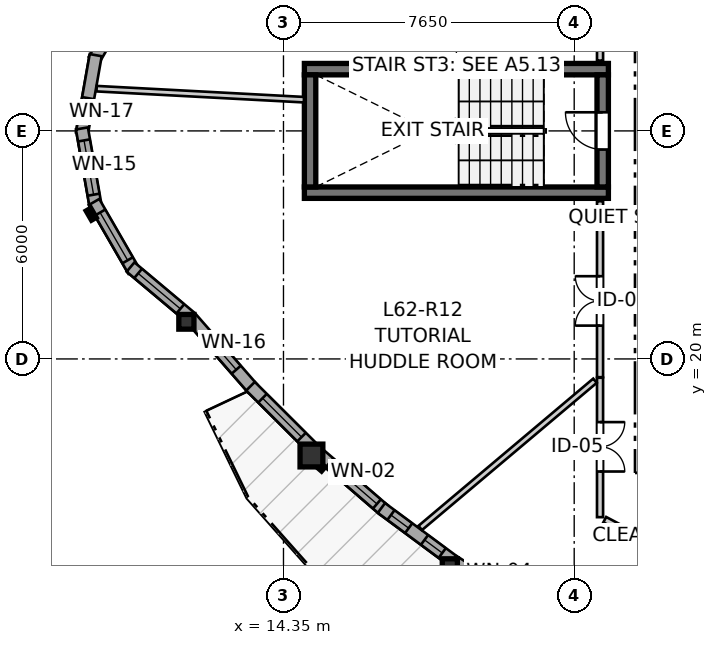
"""IFC4 building model, lengths in metres.
Left out: names, types, materials, properties, quantities, classifications, styles, units other than length and angle.
Written with IfcOpenShell. Run it as: python <this file> out.ifc"""

import sys

from ifc_helpers import new_model, si_unit, direction, frame, frame_2d, origin, origin_2d, place, context, subcontext, project, spatial, rectangle, i_section, extrude, source, transform, mapped, element, fill, save


model = new_model("IFC4")
c1 = context("Model", 3, precision=1e-05, world=origin(), true_north=direction((0.0, 1.0)))
c2 = subcontext(c1, "Body", "Model", "MODEL_VIEW")
j1 = project(units=[si_unit("LENGTHUNIT", "METRE"), si_unit("PLANEANGLEUNIT", "RADIAN")], contexts=[c1])
p1 = place(None, origin())
s1 = spatial("IfcSite", under=j1, at=p1, CompositionType="ELEMENT")
p2 = place(p1, origin())
s2 = spatial("IfcBuilding", under=s1, at=p2, CompositionType="ELEMENT")
p3 = place(p2, frame((0.0, 0.0, 208.4)))
s3 = spatial("IfcBuildingStorey", under=s2, at=p3, CompositionType="ELEMENT", Elevation=208.4)
for number, where, z_axis, x_axis in (
    (1, (14.9, 24.375, 0.0), (0.0, 0.0, 1.0), (1.0, 0.0, 0.0)),
    (2, (22.9, 27.625, 0.0), (0.0, 0.0, 1.0), (-1.0, 0.0, 0.0)),
):
    element("IfcWall", number, at=place(p3, frame(where, z_axis=z_axis, x_axis=x_axis)), inside=s3, PredefinedType="SHEAR", context=c2, shape_type="SweptSolid", body=[
        extrude(rectangle(XDim=8.0, YDim=0.3, at=frame_2d((4.0, 0.0))), origin(), (0.0, 0.0, 1.0), 2.935),
    ])
p4 = place(p3, frame((15.05, 27.475, 0.0), z_axis=(0.0, 0.0, 1.0), x_axis=(0.0, -1.0, 0.0)))
e3 = element("IfcWall", 3, at=p4, inside=s3, PredefinedType="SHEAR", context=c2, shape_type="SweptSolid", body=[
    extrude(rectangle(XDim=2.95, YDim=0.3, at=frame_2d((1.475, 0.0))), origin(), (0.0, 0.0, 1.0), 2.935),
])
p5 = place(p3, frame((22.75, 24.525, 0.0), z_axis=(0.0, 0.0, 1.0), x_axis=(0.0, 1.0, 0.0)))
e4 = element("IfcWall", 4, at=p5, inside=s3, PredefinedType="SHEAR", context=c2, shape_type="SweptSolid", body=[
    extrude(rectangle(XDim=2.95, YDim=0.3, at=frame_2d((1.475, 0.0))), origin(), (0.0, 0.0, 1.0), 2.935),
])
p6 = place(p5, frame((0.985, 0.0, 0.0)))
e5 = element("IfcOpeningElement", 5, at=p6, cuts=e4, PredefinedType="OPENING", context=c2, shape_type="SweptSolid", body=[
    extrude(rectangle(XDim=0.98, YDim=2.15, at=frame_2d((0.49, 1.075))), frame((0.0, 0.16, 0.0), z_axis=(0.0, -1.0, 0.0), x_axis=(1.0, 0.0, 0.0)), (0.0, 0.0, 1.0), 0.32),
])
m1 = source(origin(), c2, "Body", "SweptSolid", [
    extrude(i_section(OverallWidth=0.398, OverallDepth=0.387, WebThickness=0.019, FlangeThickness=0.03, FilletRadius=0.015, at=origin_2d()), origin(), (0.0, 0.0, 1.0), 2.935),
])
p7 = place(p3, frame((11.795, 20.977, 0.0), z_axis=(0.0, 0.0, 1.0), x_axis=(1.0, 0.0, 0.0)))
e6 = element("IfcColumn", 6, at=p7, inside=s3, PredefinedType="PILASTER", context=c2, shape_type="MappedRepresentation", body=[
    mapped(m1, transform((0.0, 0.0, 0.0), x_axis=(1.0, 0.0, 0.0), y_axis=(0.0, 1.0, 0.0), z_axis=(0.0, 0.0, 1.0), scale=1.0)),
])
m2 = source(origin(), c2, "Body", "SweptSolid", [
    extrude(rectangle(XDim=0.6, YDim=0.6, at=origin_2d()), origin(), (0.0, 0.0, 1.0), 2.935),
])
p8 = place(p3, frame((15.086, 17.459, 0.0), z_axis=(0.0, 0.0, 1.0), x_axis=(1.0, 0.0, 0.0)))
e7 = element("IfcColumn", 7, at=p8, inside=s3, PredefinedType="COLUMN", context=c2, shape_type="MappedRepresentation", body=[
    mapped(m2, transform((0.0, 0.0, 0.0), x_axis=(1.0, 0.0, 0.0), y_axis=(0.0, 1.0, 0.0), z_axis=(0.0, 0.0, 1.0), scale=1.0)),
])
p9 = place(p3, frame((18.727, 14.548, 0.0), z_axis=(0.0, 0.0, 1.0), x_axis=(1.0, 0.0, 0.0)))
e8 = element("IfcColumn", 8, at=p9, inside=s3, PredefinedType="PILASTER", context=c2, shape_type="MappedRepresentation", body=[
    mapped(m1, transform((0.0, 0.0, 0.0), x_axis=(1.0, 0.0, 0.0), y_axis=(0.0, 1.0, 0.0), z_axis=(0.0, 0.0, 1.0), scale=1.0)),
])
p10 = place(p3, frame((10.409, 29.681, 0.0), z_axis=(0.0, 0.0, 1.0), x_axis=(-0.49990781971, -0.866078617559, 0.0)))
e9 = element("IfcWall", 9, at=p10, inside=s3, PredefinedType="SOLIDWALL", context=c2, shape_type="SweptSolid", body=[
    extrude(rectangle(XDim=2.09, YDim=0.32, at=frame_2d((1.045, 0.0))), origin(), (0.0, 0.0, 1.0), 2.555),
])
p11 = place(p10, frame((0.42, 0.0, 0.82)))
e10 = element("IfcOpeningElement", 10, at=p11, cuts=e9, PredefinedType="OPENING", context=c2, shape_type="SweptSolid", body=[
    extrude(rectangle(XDim=1.25, YDim=1.35, at=frame_2d((0.625, 0.675))), frame((0.0, 0.17, 0.0), z_axis=(0.0, -1.0, 0.0), x_axis=(1.0, 0.0, 0.0)), (0.0, 0.0, 1.0), 0.34),
])
p12 = place(p3, frame((9.409, 27.993, 0.0), z_axis=(0.0, 0.0, 1.0), x_axis=(-0.173672066494, -0.984803540469, 0.0)))
e11 = element("IfcWall", 11, at=p12, inside=s3, PredefinedType="SOLIDWALL", context=c2, shape_type="SweptSolid", body=[
    extrude(rectangle(XDim=2.09, YDim=0.32, at=frame_2d((1.045, 0.0))), origin(), (0.0, 0.0, 1.0), 2.555),
])
p13 = place(p12, frame((1.149, 0.0, 0.82)))
e12 = element("IfcOpeningElement", 12, at=p13, cuts=e11, PredefinedType="OPENING", context=c2, shape_type="SweptSolid", body=[
    extrude(rectangle(XDim=0.58, YDim=1.35, at=frame_2d((0.29, 0.675))), frame((0.0, 0.17, 0.0), z_axis=(0.0, -1.0, 0.0), x_axis=(1.0, 0.0, 0.0)), (0.0, 0.0, 1.0), 0.34),
])
p14 = place(p3, frame((9.046, 26.065, 0.0), z_axis=(0.0, 0.0, 1.0), x_axis=(0.173672066494, -0.984803540469, 0.0)))
e13 = element("IfcWall", 13, at=p14, inside=s3, PredefinedType="SOLIDWALL", context=c2, shape_type="SweptSolid", body=[
    extrude(rectangle(XDim=2.09, YDim=0.32, at=frame_2d((1.045, 0.0))), origin(), (0.0, 0.0, 1.0), 2.555),
])
p15 = place(p14, frame((0.32, 0.0, 0.82)))
e14 = element("IfcOpeningElement", 14, at=p15, cuts=e13, PredefinedType="OPENING", context=c2, shape_type="SweptSolid", body=[
    extrude(rectangle(XDim=1.45, YDim=1.25, at=frame_2d((0.725, 0.625))), frame((0.0, 0.17, 0.0), z_axis=(0.0, -1.0, 0.0), x_axis=(1.0, 0.0, 0.0)), (0.0, 0.0, 1.0), 0.34),
])
p16 = place(p3, frame((9.365, 24.129, 0.0), z_axis=(0.0, 0.0, 1.0), x_axis=(0.49990781971, -0.866078617559, 0.0)))
e15 = element("IfcWall", 15, at=p16, inside=s3, PredefinedType="SOLIDWALL", context=c2, shape_type="SweptSolid", body=[
    extrude(rectangle(XDim=2.09, YDim=0.32, at=frame_2d((1.045, 0.0))), origin(), (0.0, 0.0, 1.0), 2.555),
])
p17 = place(p16, frame((0.32, 0.0, 0.82)))
e16 = element("IfcOpeningElement", 16, at=p17, cuts=e15, PredefinedType="OPENING", context=c2, shape_type="SweptSolid", body=[
    extrude(rectangle(XDim=1.45, YDim=1.25, at=frame_2d((0.725, 0.625))), frame((0.0, 0.17, 0.0), z_axis=(0.0, -1.0, 0.0), x_axis=(1.0, 0.0, 0.0)), (0.0, 0.0, 1.0), 0.34),
])
p18 = place(p3, frame((10.326, 22.419, 0.0), z_axis=(0.0, 0.0, 1.0), x_axis=(0.766099948115, -0.642721455608, 0.0)))
e17 = element("IfcWall", 17, at=p18, inside=s3, PredefinedType="SOLIDWALL", context=c2, shape_type="SweptSolid", body=[
    extrude(rectangle(XDim=2.032, YDim=0.32, at=frame_2d((1.016, 0.0))), origin(), (0.0, 0.0, 1.0), 2.555),
])
p19 = place(p18, frame((0.261, 0.0, 0.82)))
e18 = element("IfcOpeningElement", 18, at=p19, cuts=e17, PredefinedType="OPENING", context=c2, shape_type="SweptSolid", body=[
    extrude(rectangle(XDim=1.45, YDim=1.25, at=frame_2d((0.725, 0.625))), frame((0.0, 0.17, 0.0), z_axis=(0.0, -1.0, 0.0), x_axis=(1.0, 0.0, 0.0)), (0.0, 0.0, 1.0), 0.34),
])
p20 = place(p3, frame((11.929, 21.067, 0.0), z_axis=(0.0, 0.0, 1.0), x_axis=(0.657623588515, -0.753346677054, 0.0)))
e19 = element("IfcWall", 19, at=p20, inside=s3, PredefinedType="SOLIDWALL", context=c2, shape_type="SweptSolid", body=[
    extrude(rectangle(XDim=2.454, YDim=0.32, at=frame_2d((1.227, 0.0))), origin(), (0.0, 0.0, 1.0), 2.555),
])
p21 = place(p20, frame((0.642, 0.0, 0.82)))
e20 = element("IfcOpeningElement", 20, at=p21, cuts=e19, PredefinedType="OPENING", context=c2, shape_type="SweptSolid", body=[
    extrude(rectangle(XDim=1.15, YDim=1.2, at=frame_2d((0.575, 0.6))), frame((0.0, 0.17, 0.0), z_axis=(0.0, -1.0, 0.0), x_axis=(1.0, 0.0, 0.0)), (0.0, 0.0, 1.0), 0.34),
])
p22 = place(p3, frame((13.483, 19.282, 0.0), z_axis=(0.0, 0.0, 1.0), x_axis=(0.7083616261, -0.70584970544, 0.0)))
e21 = element("IfcWall", 21, at=p22, inside=s3, PredefinedType="SOLIDWALL", context=c2, shape_type="SweptSolid", body=[
    extrude(rectangle(XDim=2.333, YDim=0.32, at=frame_2d((1.166, 0.0))), origin(), (0.0, 0.0, 1.0), 2.555),
])
p23 = place(p22, frame((0.446, 0.0, 0.82)))
e22 = element("IfcOpeningElement", 22, at=p23, cuts=e21, PredefinedType="OPENING", context=c2, shape_type="SweptSolid", body=[
    extrude(rectangle(XDim=1.45, YDim=1.25, at=frame_2d((0.725, 0.625))), frame((0.0, 0.17, 0.0), z_axis=(0.0, -1.0, 0.0), x_axis=(1.0, 0.0, 0.0)), (0.0, 0.0, 1.0), 0.34),
])
p24 = place(p3, frame((15.259, 17.521, 0.0), z_axis=(0.0, 0.0, 1.0), x_axis=(0.757533377792, -0.652796431923, 0.0)))
e23 = element("IfcWall", 23, at=p24, inside=s3, PredefinedType="SOLIDWALL", context=c2, shape_type="SweptSolid", body=[
    extrude(rectangle(XDim=2.294, YDim=0.32, at=frame_2d((1.147, 0.0))), origin(), (0.0, 0.0, 1.0), 2.555),
])
p25 = place(p24, frame((0.397, 0.0, 0.82)))
e24 = element("IfcOpeningElement", 24, at=p25, cuts=e23, PredefinedType="OPENING", context=c2, shape_type="SweptSolid", body=[
    extrude(rectangle(XDim=1.65, YDim=1.45, at=frame_2d((0.825, 0.725))), frame((0.0, 0.17, 0.0), z_axis=(0.0, -1.0, 0.0), x_axis=(1.0, 0.0, 0.0)), (0.0, 0.0, 1.0), 0.34),
])
p26 = place(p3, frame((16.927, 16.079, 0.0), z_axis=(0.0, 0.0, 1.0), x_axis=(0.803843896942, -0.594840305754, 0.0)))
e25 = element("IfcWall", 25, at=p26, inside=s3, PredefinedType="SOLIDWALL", context=c2, shape_type="SweptSolid", body=[
    extrude(rectangle(XDim=2.337, YDim=0.32, at=frame_2d((1.169, 0.0))), origin(), (0.0, 0.0, 1.0), 2.555),
])
p27 = place(p26, frame((0.312, 0.0, 0.82)))
e26 = element("IfcOpeningElement", 26, at=p27, cuts=e25, PredefinedType="OPENING", context=c2, shape_type="SweptSolid", body=[
    extrude(rectangle(XDim=0.58, YDim=1.35, at=frame_2d((0.29, 0.675))), frame((0.0, 0.17, 0.0), z_axis=(0.0, -1.0, 0.0), x_axis=(1.0, 0.0, 0.0)), (0.0, 0.0, 1.0), 0.34),
])
p28 = place(p26, frame((1.411, 0.0, 0.82)))
e27 = element("IfcOpeningElement", 27, at=p28, cuts=e25, PredefinedType="OPENING", context=c2, shape_type="SweptSolid", body=[
    extrude(rectangle(XDim=0.58, YDim=1.35, at=frame_2d((0.29, 0.675))), frame((0.0, 0.17, 0.0), z_axis=(0.0, -1.0, 0.0), x_axis=(1.0, 0.0, 0.0)), (0.0, 0.0, 1.0), 0.34),
])
p29 = place(p3, frame((18.829, 14.673, 0.0), z_axis=(0.0, 0.0, 1.0), x_axis=(0.846418748285, -0.53251788942, 0.0)))
e28 = element("IfcWall", 28, at=p29, inside=s3, PredefinedType="SOLIDWALL", context=c2, shape_type="SweptSolid", body=[
    extrude(rectangle(XDim=2.324, YDim=0.32, at=frame_2d((1.162, 0.0))), origin(), (0.0, 0.0, 1.0), 2.555),
])
p30 = place(p29, frame((0.477, 0.0, 0.82)))
e29 = element("IfcOpeningElement", 29, at=p30, cuts=e28, PredefinedType="OPENING", context=c2, shape_type="SweptSolid", body=[
    extrude(rectangle(XDim=1.35, YDim=1.45, at=frame_2d((0.675, 0.725))), frame((0.0, 0.17, 0.0), z_axis=(0.0, -1.0, 0.0), x_axis=(1.0, 0.0, 0.0)), (0.0, 0.0, 1.0), 0.34),
])
p31 = place(p3, frame((22.68, 19.52, 0.0), z_axis=(0.0, 0.0, 1.0), x_axis=(0.0, 1.0, 0.0)))
e30 = element("IfcWall", 30, at=p31, inside=s3, PredefinedType="PARTITIONING", context=c2, shape_type="SweptSolid", body=[
    extrude(rectangle(XDim=4.63, YDim=0.16, at=frame_2d((2.315, 0.0))), origin(), (0.0, 0.0, 1.0), 2.935),
])
p32 = place(p31, frame((1.357, 0.0, 0.0)))
e31 = element("IfcOpeningElement", 31, at=p32, cuts=e30, PredefinedType="OPENING", context=c2, shape_type="SweptSolid", body=[
    extrude(rectangle(XDim=1.3, YDim=2.1, at=frame_2d((0.65, 1.05))), frame((0.0, 0.09, 0.0), z_axis=(0.0, -1.0, 0.0), x_axis=(1.0, 0.0, 0.0)), (0.0, 0.0, 1.0), 0.18),
])
p33 = place(p3, frame((22.68, 19.505, 0.0), z_axis=(0.0, 0.0, 1.0), x_axis=(0.0, -1.0, 0.0)))
e32 = element("IfcWall", 32, at=p33, inside=s3, PredefinedType="PARTITIONING", context=c2, shape_type="SweptSolid", body=[
    extrude(rectangle(XDim=3.668, YDim=0.16, at=frame_2d((1.834, 0.0))), origin(), (0.0, 0.0, 1.0), 2.935),
])
p34 = place(p33, frame((1.167, 0.0, 0.0)))
e33 = element("IfcOpeningElement", 33, at=p34, cuts=e32, PredefinedType="OPENING", context=c2, shape_type="SweptSolid", body=[
    extrude(rectangle(XDim=1.3, YDim=2.1, at=frame_2d((0.65, 1.05))), frame((0.0, 0.09, 0.0), z_axis=(0.0, -1.0, 0.0), x_axis=(1.0, 0.0, 0.0)), (0.0, 0.0, 1.0), 0.18),
])
p35 = place(p3, frame((22.68, 27.85, 0.0), z_axis=(0.0, 0.0, 1.0), x_axis=(0.0, 1.0, 0.0)))
e34 = element("IfcWall", 34, at=p35, inside=s3, PredefinedType="PARTITIONING", context=c2, shape_type="SweptSolid", body=[
    extrude(rectangle(XDim=1.929, YDim=0.16, at=frame_2d((0.964, 0.0))), origin(), (0.0, 0.0, 1.0), 2.935),
])
p36 = place(p35, frame((0.53, 0.0, 0.0)))
e35 = element("IfcOpeningElement", 35, at=p36, cuts=e34, PredefinedType="OPENING", context=c2, shape_type="SweptSolid", body=[
    extrude(rectangle(XDim=0.96, YDim=2.1, at=frame_2d((0.48, 1.05))), frame((0.0, 0.09, 0.0), z_axis=(0.0, -1.0, 0.0), x_axis=(1.0, 0.0, 0.0)), (0.0, 0.0, 1.0), 0.18),
])
p37 = place(p3, frame((17.948, 15.553, 0.0), z_axis=(0.0, 0.0, 1.0), x_axis=(0.764805901006, 0.644260765364, 0.0)))
e36 = element("IfcWall", 36, at=p37, inside=s3, PredefinedType="PARTITIONING", context=c2, shape_type="SweptSolid", body=[
    extrude(rectangle(XDim=6.013, YDim=0.145, at=frame_2d((3.007, 0.0))), origin(), (0.0, 0.0, 1.0), 2.935),
])
p38 = place(p3, frame((9.433, 27.112, 0.0), z_axis=(0.0, 0.0, 1.0), x_axis=(0.998589537807, -0.053093643525, 0.0)))
e37 = element("IfcWall", 37, at=p38, inside=s3, PredefinedType="PARTITIONING", context=c2, shape_type="SweptSolid", body=[
    extrude(rectangle(XDim=5.463, YDim=0.145, at=frame_2d((2.731, 0.0))), origin(), (0.0, 0.0, 1.0), 2.935),
])
p39 = place(p3, frame((22.804, 15.771, 0.0), z_axis=(0.0, 0.0, 1.0), x_axis=(0.884421402819, -0.4666891709, 0.0)))
e38 = element("IfcWall", 38, at=p39, inside=s3, PredefinedType="PARTITIONING", context=c2, shape_type="SweptSolid", body=[
    extrude(rectangle(XDim=1.451, YDim=0.16, at=frame_2d((0.726, 0.0))), origin(), (0.0, 0.0, 1.0), 2.935),
])
m3 = source(origin(), c2, "Body", "SweptSolid", [
    extrude(rectangle(XDim=0.58, YDim=1.35, at=frame_2d((0.29, 0.675))), frame((0.0, 0.03, 0.0), z_axis=(0.0, -1.0, 0.0), x_axis=(1.0, 0.0, 0.0)), (0.0, 0.0, 1.0), 0.06),
])
p40 = place(p13, origin())
e39 = element("IfcWindow", 39, at=p40, inside=s3, PartitioningType="SINGLE_PANEL", PredefinedType="WINDOW", context=c2, shape_type="MappedRepresentation", body=[
    mapped(m3, transform((0.0, 0.0, 0.0), x_axis=(1.0, 0.0, 0.0), y_axis=(0.0, 1.0, 0.0), z_axis=(0.0, 0.0, 1.0), scale=1.0)),
])
fill(e12, e39)
m4 = source(origin(), c2, "Body", "SweptSolid", [
    extrude(rectangle(XDim=1.45, YDim=1.25, at=frame_2d((0.725, 0.625))), frame((0.0, 0.03, 0.0), z_axis=(0.0, -1.0, 0.0), x_axis=(1.0, 0.0, 0.0)), (0.0, 0.0, 1.0), 0.06),
])
p41 = place(p15, origin())
e40 = element("IfcWindow", 40, at=p41, inside=s3, PartitioningType="SINGLE_PANEL", PredefinedType="WINDOW", context=c2, shape_type="MappedRepresentation", body=[
    mapped(m4, transform((0.0, 0.0, 0.0), x_axis=(1.0, 0.0, 0.0), y_axis=(0.0, 1.0, 0.0), z_axis=(0.0, 0.0, 1.0), scale=1.0)),
])
fill(e14, e40)
p42 = place(p17, origin())
e41 = element("IfcWindow", 41, at=p42, inside=s3, PartitioningType="SINGLE_PANEL", PredefinedType="WINDOW", context=c2, shape_type="MappedRepresentation", body=[
    mapped(m4, transform((0.0, 0.0, 0.0), x_axis=(1.0, 0.0, 0.0), y_axis=(0.0, 1.0, 0.0), z_axis=(0.0, 0.0, 1.0), scale=1.0)),
])
fill(e16, e41)
p43 = place(p19, origin())
e42 = element("IfcWindow", 42, at=p43, inside=s3, PartitioningType="SINGLE_PANEL", PredefinedType="WINDOW", context=c2, shape_type="MappedRepresentation", body=[
    mapped(m4, transform((0.0, 0.0, 0.0), x_axis=(1.0, 0.0, 0.0), y_axis=(0.0, 1.0, 0.0), z_axis=(0.0, 0.0, 1.0), scale=1.0)),
])
fill(e18, e42)
m5 = source(origin(), c2, "Body", "SweptSolid", [
    extrude(rectangle(XDim=1.15, YDim=1.2, at=frame_2d((0.575, 0.6))), frame((0.0, 0.03, 0.0), z_axis=(0.0, -1.0, 0.0), x_axis=(1.0, 0.0, 0.0)), (0.0, 0.0, 1.0), 0.06),
])
p44 = place(p21, origin())
e43 = element("IfcWindow", 43, at=p44, inside=s3, PartitioningType="SINGLE_PANEL", PredefinedType="WINDOW", context=c2, shape_type="MappedRepresentation", body=[
    mapped(m5, transform((0.0, 0.0, 0.0), x_axis=(1.0, 0.0, 0.0), y_axis=(0.0, 1.0, 0.0), z_axis=(0.0, 0.0, 1.0), scale=1.0)),
])
fill(e20, e43)
p45 = place(p23, origin())
e44 = element("IfcWindow", 44, at=p45, inside=s3, PartitioningType="SINGLE_PANEL", PredefinedType="WINDOW", context=c2, shape_type="MappedRepresentation", body=[
    mapped(m4, transform((0.0, 0.0, 0.0), x_axis=(1.0, 0.0, 0.0), y_axis=(0.0, 1.0, 0.0), z_axis=(0.0, 0.0, 1.0), scale=1.0)),
])
fill(e22, e44)
m6 = source(origin(), c2, "Body", "SweptSolid", [
    extrude(rectangle(XDim=1.65, YDim=1.45, at=frame_2d((0.825, 0.725))), frame((0.0, 0.03, 0.0), z_axis=(0.0, -1.0, 0.0), x_axis=(1.0, 0.0, 0.0)), (0.0, 0.0, 1.0), 0.06),
])
p46 = place(p25, origin())
e45 = element("IfcWindow", 45, at=p46, inside=s3, PartitioningType="SINGLE_PANEL", PredefinedType="WINDOW", context=c2, shape_type="MappedRepresentation", body=[
    mapped(m6, transform((0.0, 0.0, 0.0), x_axis=(1.0, 0.0, 0.0), y_axis=(0.0, 1.0, 0.0), z_axis=(0.0, 0.0, 1.0), scale=1.0)),
])
fill(e24, e45)
p47 = place(p27, origin())
e46 = element("IfcWindow", 46, at=p47, inside=s3, PartitioningType="SINGLE_PANEL", PredefinedType="WINDOW", context=c2, shape_type="MappedRepresentation", body=[
    mapped(m3, transform((0.0, 0.0, 0.0), x_axis=(1.0, 0.0, 0.0), y_axis=(0.0, 1.0, 0.0), z_axis=(0.0, 0.0, 1.0), scale=1.0)),
])
fill(e26, e46)
p48 = place(p28, origin())
e47 = element("IfcWindow", 47, at=p48, inside=s3, PartitioningType="SINGLE_PANEL", PredefinedType="WINDOW", context=c2, shape_type="MappedRepresentation", body=[
    mapped(m3, transform((0.0, 0.0, 0.0), x_axis=(1.0, 0.0, 0.0), y_axis=(0.0, 1.0, 0.0), z_axis=(0.0, 0.0, 1.0), scale=1.0)),
])
fill(e27, e47)
m7 = source(origin(), c2, "Body", "SweptSolid", [
    extrude(rectangle(XDim=0.98, YDim=2.15, at=frame_2d((0.49, 1.075))), frame((0.0, 0.025, 0.0), z_axis=(0.0, -1.0, 0.0), x_axis=(1.0, 0.0, 0.0)), (0.0, 0.0, 1.0), 0.05),
])
p49 = place(p6, origin())
e48 = element("IfcDoor", 48, at=p49, inside=s3, OperationType="SINGLE_SWING_RIGHT", PredefinedType="DOOR", context=c2, shape_type="MappedRepresentation", body=[
    mapped(m7, transform((0.0, 0.0, 0.0), x_axis=(1.0, 0.0, 0.0), y_axis=(0.0, 1.0, 0.0), z_axis=(0.0, 0.0, 1.0), scale=1.0)),
])
fill(e5, e48)
m8 = source(origin(), c2, "Body", "SweptSolid", [
    extrude(rectangle(XDim=1.3, YDim=2.1, at=frame_2d((0.65, 1.05))), frame((0.0, 0.025, 0.0), z_axis=(0.0, -1.0, 0.0), x_axis=(1.0, 0.0, 0.0)), (0.0, 0.0, 1.0), 0.05),
])
p50 = place(p32, origin())
e49 = element("IfcDoor", 49, at=p50, inside=s3, OperationType="DOUBLE_DOOR_SINGLE_SWING", PredefinedType="DOOR", context=c2, shape_type="MappedRepresentation", body=[
    mapped(m8, transform((0.0, 0.0, 0.0), x_axis=(1.0, 0.0, 0.0), y_axis=(0.0, 1.0, 0.0), z_axis=(0.0, 0.0, 1.0), scale=1.0)),
])
fill(e31, e49)
p51 = place(p34, origin())
e50 = element("IfcDoor", 50, at=p51, inside=s3, OperationType="DOUBLE_DOOR_SINGLE_SWING", PredefinedType="DOOR", context=c2, shape_type="MappedRepresentation", body=[
    mapped(m8, transform((0.0, 0.0, 0.0), x_axis=(1.0, 0.0, 0.0), y_axis=(0.0, 1.0, 0.0), z_axis=(0.0, 0.0, 1.0), scale=1.0)),
])
fill(e33, e50)
save(model, sys.argv[1])
